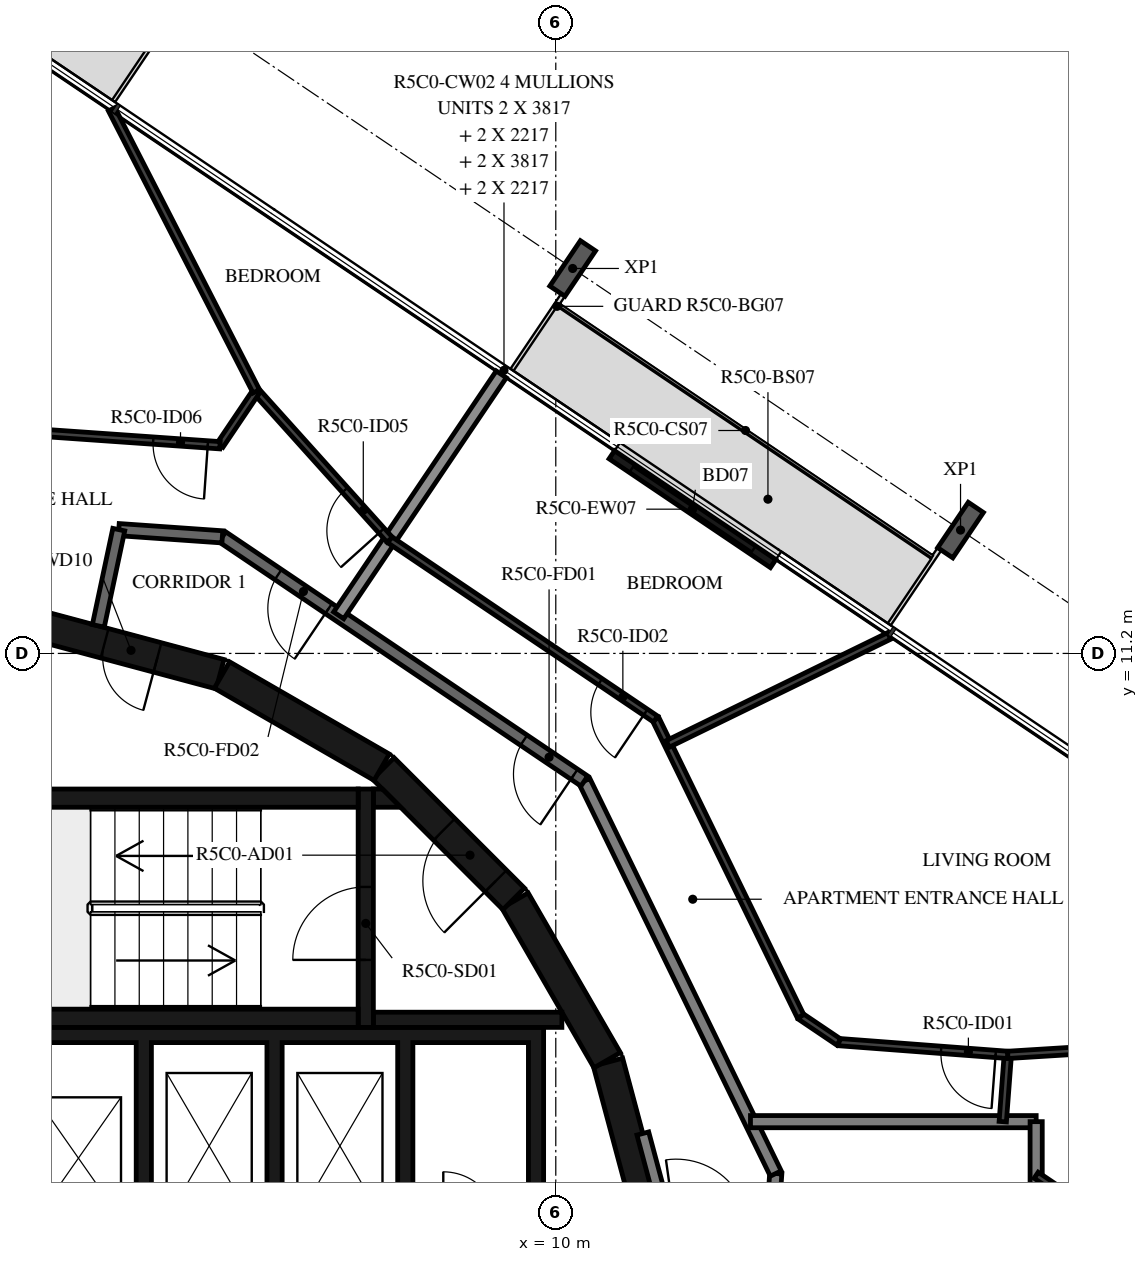
"""IFC4 building model, lengths in metres.
Left out: names, types, materials, properties, quantities, classifications, styles, units other than length and angle.
Written with IfcOpenShell. Run it as: python <this file> out.ifc"""

import sys

from ifc_helpers import new_model, si_unit, direction, frame, frame_2d, origin, origin_2d, place, context, subcontext, project, spatial, polyline, rectangle, i_section, outline, extrude, element, fill, save


model = new_model("IFC4")
c1 = context("Model", 3, precision=1e-05, world=origin(), true_north=direction((0.0, 1.0)))
c2 = subcontext(c1, "Body", "Model", "MODEL_VIEW")
j1 = project(units=[si_unit("LENGTHUNIT", "METRE"), si_unit("PLANEANGLEUNIT", "RADIAN")], contexts=[c1])
p1 = place(None, origin())
s1 = spatial("IfcSite", under=j1, at=p1, CompositionType="ELEMENT")
p2 = place(p1, origin())
s2 = spatial("IfcBuilding", under=s1, at=p2, CompositionType="ELEMENT")
p3 = place(p2, frame((0.0, 0.0, 209.4)))
s3 = spatial("IfcBuildingStorey", under=s2, at=p3, CompositionType="ELEMENT", Elevation=209.4)
for number, where, z_axis, x_axis in (
    (1, (16.656, 13.228, -0.38), (0.0, 0.0, 1.0), (0.829, -0.559, 0.0)),
    (2, (10.278, 17.531, -0.38), (0.0, 0.0, 1.0), (0.829, -0.559, 0.0)),
):
    element("IfcColumn", number, at=place(p3, frame(where, z_axis=z_axis, x_axis=x_axis)), inside=s3, PredefinedType="COLUMN", context=c2, shape_type="SweptSolid", body=[
        extrude(i_section(OverallWidth=0.3, OverallDepth=0.9, WebThickness=0.019, FlangeThickness=0.035, FilletRadius=0.03, at=origin_2d()), origin(), (0.0, 0.0, 1.0), 3.5),
    ])
p4 = place(p3, frame((13.574, 12.677, 0.0), z_axis=(0.0, 0.0, 1.0), x_axis=(-0.829068838882, 0.55914654644, 0.0)))
e3 = element("IfcWall", 3, at=p4, inside=s3, PredefinedType="STANDARD", context=c2, shape_type="SweptSolid", body=[
    extrude(rectangle(XDim=3.2, YDim=0.16, at=frame_2d((1.6, 0.0))), origin(), (0.0, 0.0, 1.0), 3.12),
])
p5 = place(p4, frame((0.4, 0.0, 0.0)))
e4 = element("IfcOpeningElement", 4, at=p5, cuts=e3, PredefinedType="OPENING", context=c2, shape_type="SweptSolid", body=[
    extrude(rectangle(XDim=2.4, YDim=2.4, at=frame_2d((1.2, 1.2))), frame((0.0, 0.09, 0.0), z_axis=(0.0, -1.0, 0.0), x_axis=(1.0, 0.0, 0.0)), (0.0, 0.0, 1.0), 0.18),
])
for number, where, z_axis, x_axis in (
    (5, (11.643, 1.55, 0.0), (0.0, 0.0, 1.0), (-0.259, 0.966, 0.0)),
    (6, (10.845, 4.51, 0.0), (0.0, 0.0, 1.0), (-0.5, 0.866, 0.0)),
):
    element("IfcWall", number, at=place(p3, frame(where, z_axis=z_axis, x_axis=x_axis)), inside=s3, PredefinedType="SHEAR", context=c2, shape_type="SweptSolid", body=[
        extrude(rectangle(XDim=3.033, YDim=0.5, at=frame_2d((1.516, 0.0))), origin(), (0.0, 0.0, 1.0), 3.12),
    ])
p6 = place(p3, frame((9.308, 7.164, 0.0), z_axis=(0.0, 0.0, 1.0), x_axis=(-0.707106781187, 0.707106781187, 0.0)))
e7 = element("IfcWall", 7, at=p6, inside=s3, PredefinedType="SHEAR", context=c2, shape_type="SweptSolid", body=[
    extrude(rectangle(XDim=3.032, YDim=0.5, at=frame_2d((1.516, 0.0))), origin(), (0.0, 0.0, 1.0), 3.12),
])
p7 = place(p6, frame((0.416, 0.0, 0.0)))
e8 = element("IfcOpeningElement", 8, at=p7, cuts=e7, PredefinedType="OPENING", context=c2, shape_type="SweptSolid", body=[
    extrude(rectangle(XDim=1.2, YDim=2.1, at=frame_2d((0.6, 1.05))), frame((0.0, 0.26, 0.0), z_axis=(0.0, -1.0, 0.0), x_axis=(1.0, 0.0, 0.0)), (0.0, 0.0, 1.0), 0.52),
])
p8 = place(p3, frame((7.137, 9.329, 0.0), z_axis=(0.0, 0.0, 1.0), x_axis=(-0.865975092491, 0.500087131594, 0.0)))
e9 = element("IfcWall", 9, at=p8, inside=s3, PredefinedType="SHEAR", context=c2, shape_type="SweptSolid", body=[
    extrude(rectangle(XDim=3.033, YDim=0.5, at=frame_2d((1.516, 0.0))), origin(), (0.0, 0.0, 1.0), 3.12),
])
p9 = place(p3, frame((4.479, 10.858, 0.0), z_axis=(0.0, 0.0, 1.0), x_axis=(-0.965948410781, 0.258734743916, 0.0)))
e10 = element("IfcWall", 10, at=p9, inside=s3, PredefinedType="SHEAR", context=c2, shape_type="SweptSolid", body=[
    extrude(rectangle(XDim=3.033, YDim=0.5, at=frame_2d((1.516, 0.0))), origin(), (0.0, 0.0, 1.0), 3.12),
])
p10 = place(p9, frame((1.066, 0.0, 0.0)))
e11 = element("IfcOpeningElement", 11, at=p10, cuts=e10, PredefinedType="OPENING", context=c2, shape_type="SweptSolid", body=[
    extrude(rectangle(XDim=0.9, YDim=2.1, at=frame_2d((0.45, 1.05))), frame((0.0, 0.26, 0.0), z_axis=(0.0, -1.0, 0.0), x_axis=(1.0, 0.0, 0.0)), (0.0, 0.0, 1.0), 0.52),
])
for number, where, z_axis, x_axis in (
    (12, (0.0, 5.2, 0.0), (0.0, 0.0, 1.0), (1.0, 0.0, 0.0)),
    (13, (0.0, 8.82, 0.0), (0.0, 0.0, 1.0), (1.0, 0.0, 0.0)),
):
    element("IfcWall", number, at=place(p3, frame(where, z_axis=z_axis, x_axis=x_axis)), inside=s3, PredefinedType="SHEAR", context=c2, shape_type="SweptSolid", body=[
        extrude(rectangle(XDim=6.75, YDim=0.3, at=frame_2d((3.375, 0.0))), origin(), (0.0, 0.0, 1.0), 3.12),
    ])
p11 = place(p3, frame((6.875, 5.05, 0.0), z_axis=(0.0, 0.0, 1.0), x_axis=(0.0, 1.0, 0.0)))
e14 = element("IfcWall", 14, at=p11, inside=s3, PredefinedType="SHEAR", context=c2, shape_type="SweptSolid", body=[
    extrude(rectangle(XDim=3.92, YDim=0.25, at=frame_2d((1.96, 0.0))), origin(), (0.0, 0.0, 1.0), 3.12),
])
p12 = place(p11, frame((1.11, 0.0, 0.0)))
e15 = element("IfcOpeningElement", 15, at=p12, cuts=e14, PredefinedType="OPENING", context=c2, shape_type="SweptSolid", body=[
    extrude(rectangle(XDim=1.2, YDim=2.1, at=frame_2d((0.6, 1.05))), frame((0.0, 0.135, 0.0), z_axis=(0.0, -1.0, 0.0), x_axis=(1.0, 0.0, 0.0)), (0.0, 0.0, 1.0), 0.27),
])
p13 = place(p3, frame((7.0, 5.175, 0.0), z_axis=(0.0, 0.0, 1.0), x_axis=(1.0, 0.0, 0.0)))
e16 = element("IfcWall", 16, at=p13, inside=s3, PredefinedType="SHEAR", context=c2, shape_type="SweptSolid", body=[
    extrude(rectangle(XDim=3.1, YDim=0.25, at=frame_2d((1.55, 0.0))), origin(), (0.0, 0.0, 1.0), 3.12),
])
p14 = place(p3, origin())
e17 = element("IfcWall", 17, at=p14, inside=s3, PredefinedType="SHEAR", context=c2, shape_type="SweptSolid", body=[
    extrude(outline(polyline([(7.448, 8.67), (7.0, 8.67), (7.0, 8.97), (7.148, 8.97), (7.448, 8.67)])), origin(), (0.0, 0.0, 1.0), 3.12),
])
p15 = place(p3, origin())
e18 = element("IfcWall", 18, at=p15, inside=s3, PredefinedType="SHEAR", context=c2, shape_type="SweptSolid", body=[
    extrude(outline(polyline([(-9.55, 4.8), (-5.5, 4.8), (-5.5, 1.9), (-5.25, 1.9), (-5.25, 4.8), (-1.2, 4.8), (-1.2, 1.9), (-0.95, 1.9), (-0.95, 4.8), (0.95, 4.8), (0.95, 1.9), (1.2, 1.9), (1.2, 4.8), (3.1, 4.8), (3.1, 1.9), (3.35, 1.9), (3.35, 4.8), (5.25, 4.8), (5.25, 1.9), (5.5, 1.9), (5.5, 4.8), (7.4, 4.8), (7.4, 1.9), (7.65, 1.9), (7.65, 4.8), (9.55, 4.8), (9.55, 1.9), (9.8, 1.9), (9.8, 4.8), (9.8, 5.05), (-9.8, 5.05), (-9.8, 4.8), (-9.8, 1.9), (-9.55, 1.9), (-9.55, 4.8)])), origin(), (0.0, 0.0, 1.0), 3.12),
])
p16 = place(p3, frame((11.87, 1.668, 0.0), z_axis=(0.0, 0.0, 1.0), x_axis=(-0.258836880648, 0.965921047093, 0.0)))
e19 = element("IfcWall", 19, at=p16, inside=s3, PredefinedType="STANDARD", context=c2, shape_type="SweptSolid", body=[
    extrude(rectangle(XDim=1.695, YDim=0.2, at=frame_2d((0.848, 0.0))), origin(), (0.0, 0.0, 1.0), 3.12),
])
p17 = place(p3, frame((13.566, 1.906, 0.0), z_axis=(0.0, 0.0, 1.0), x_axis=(0.07005495793, 0.997543133338, 0.0)))
e20 = element("IfcWall", 20, at=p17, inside=s3, PredefinedType="STANDARD", context=c2, shape_type="SweptSolid", body=[
    extrude(rectangle(XDim=0.742, YDim=0.2, at=frame_2d((0.371, 0.0))), origin(), (0.0, 0.0, 1.0), 3.12),
])
p18 = place(p3, frame((13.618, 2.647, 0.0), z_axis=(0.0, 0.0, 1.0), x_axis=(-0.438366026218, 0.898796543751, 0.0)))
e21 = element("IfcWall", 21, at=p18, inside=s3, PredefinedType="STANDARD", context=c2, shape_type="SweptSolid", body=[
    extrude(rectangle(XDim=7.181, YDim=0.2, at=frame_2d((3.591, 0.0))), origin(), (0.0, 0.0, 1.0), 3.12),
])
p19 = place(p3, frame((10.47, 9.101, 0.0), z_axis=(0.0, 0.0, 1.0), x_axis=(-0.829035841718, 0.559195469534, 0.0)))
e22 = element("IfcWall", 22, at=p19, inside=s3, PredefinedType="STANDARD", context=c2, shape_type="SweptSolid", body=[
    extrude(rectangle(XDim=7.181, YDim=0.2, at=frame_2d((3.591, 0.0))), origin(), (0.0, 0.0, 1.0), 3.12),
])
p20 = place(p19, frame((0.2, 0.0, 0.0)))
e23 = element("IfcOpeningElement", 23, at=p20, cuts=e22, PredefinedType="OPENING", context=c2, shape_type="SweptSolid", body=[
    extrude(rectangle(XDim=1.0, YDim=2.1, at=frame_2d((0.5, 1.05))), frame((0.0, 0.11, 0.0), z_axis=(0.0, -1.0, 0.0), x_axis=(1.0, 0.0, 0.0)), (0.0, 0.0, 1.0), 0.22),
])
p21 = place(p19, frame((5.073, 0.0, 0.0)))
e24 = element("IfcOpeningElement", 24, at=p21, cuts=e22, PredefinedType="OPENING", context=c2, shape_type="SweptSolid", body=[
    extrude(rectangle(XDim=1.0, YDim=2.1, at=frame_2d((0.5, 1.05))), frame((0.0, 0.11, 0.0), z_axis=(0.0, -1.0, 0.0), x_axis=(1.0, 0.0, 0.0)), (0.0, 0.0, 1.0), 0.22),
])
p22 = place(p3, frame((4.517, 13.117, 0.0), z_axis=(0.0, 0.0, 1.0), x_axis=(-0.997562153664, 0.069783591025, 0.0)))
e25 = element("IfcWall", 25, at=p22, inside=s3, PredefinedType="STANDARD", context=c2, shape_type="SweptSolid", body=[
    extrude(rectangle(XDim=1.707, YDim=0.2, at=frame_2d((0.854, 0.0))), origin(), (0.0, 0.0, 1.0), 3.12),
])
p23 = place(p3, frame((2.813, 13.236, 0.0), z_axis=(0.0, 0.0, 1.0), x_axis=(-0.207911086063, -0.978147729278, 0.0)))
e26 = element("IfcWall", 26, at=p23, inside=s3, PredefinedType="STANDARD", context=c2, shape_type="SweptSolid", body=[
    extrude(rectangle(XDim=1.618, YDim=0.2, at=frame_2d((0.809, 0.0))), origin(), (0.0, 0.0, 1.0), 3.12),
])
p24 = place(p3, frame((17.9, 3.5, 0.0), z_axis=(0.0, 0.0, 1.0), x_axis=(-1.0, 0.0, 0.0)))
e27 = element("IfcWall", 27, at=p24, inside=s3, PredefinedType="STANDARD", context=c2, shape_type="SweptSolid", body=[
    extrude(rectangle(XDim=4.698, YDim=0.2, at=frame_2d((2.349, 0.0))), origin(), (0.0, 0.0, 1.0), 3.12),
])
p25 = place(p3, frame((17.9, -3.5, 0.0), z_axis=(0.0, 0.0, 1.0), x_axis=(0.0, 1.0, 0.0)))
e28 = element("IfcWall", 28, at=p25, inside=s3, PredefinedType="STANDARD", context=c2, shape_type="SweptSolid", body=[
    extrude(rectangle(XDim=7.0, YDim=0.2, at=frame_2d((3.5, 0.0))), origin(), (0.0, 0.0, 1.0), 3.12),
])
p26 = place(p3, frame((9.104, 15.79, 0.0), z_axis=(0.0, 0.0, 1.0), x_axis=(-0.559193912135, -0.829036892201, 0.0)))
e29 = element("IfcWall", 29, at=p26, inside=s3, PredefinedType="STANDARD", context=c2, shape_type="SweptSolid", body=[
    extrude(rectangle(XDim=4.781, YDim=0.2, at=frame_2d((2.39, 0.0))), origin(), (0.0, 0.0, 1.0), 2.73),
])
p27 = place(p3, frame((17.351, 3.5, 0.0), z_axis=(0.0, 0.0, 1.0), x_axis=(0.075374124137, 0.997155324616, 0.0)))
e30 = element("IfcWall", 30, at=p27, inside=s3, PredefinedType="PARTITIONING", context=c2, shape_type="SweptSolid", body=[
    extrude(rectangle(XDim=1.101, YDim=0.12, at=frame_2d((0.551, 0.0))), origin(), (0.0, 0.0, 1.0), 3.12),
])
p28 = place(p3, frame((17.434, 4.598, 0.0), z_axis=(0.0, 0.0, 1.0), x_axis=(-0.997152077354, 0.075417071205, 0.0)))
e31 = element("IfcWall", 31, at=p28, inside=s3, PredefinedType="PARTITIONING", context=c2, shape_type="SweptSolid", body=[
    extrude(rectangle(XDim=2.787, YDim=0.12, at=frame_2d((1.394, 0.0))), origin(), (0.0, 0.0, 1.0), 3.12),
])
p29 = place(p28, frame((0.2, 0.0, 0.0)))
e32 = element("IfcOpeningElement", 32, at=p29, cuts=e31, PredefinedType="OPENING", context=c2, shape_type="SweptSolid", body=[
    extrude(rectangle(XDim=0.9, YDim=2.1, at=frame_2d((0.45, 1.05))), frame((0.0, 0.07, 0.0), z_axis=(0.0, -1.0, 0.0), x_axis=(1.0, 0.0, 0.0)), (0.0, 0.0, 1.0), 0.14),
])
p30 = place(p3, frame((14.654, 4.808, 0.0), z_axis=(0.0, 0.0, 1.0), x_axis=(-0.829065184024, 0.559151965604, 0.0)))
e33 = element("IfcWall", 33, at=p30, inside=s3, PredefinedType="PARTITIONING", context=c2, shape_type="SweptSolid", body=[
    extrude(rectangle(XDim=0.758, YDim=0.12, at=frame_2d((0.379, 0.0))), origin(), (0.0, 0.0, 1.0), 3.12),
])
p31 = place(p3, frame((14.026, 5.232, 0.0), z_axis=(0.0, 0.0, 1.0), x_axis=(-0.438374985284, 0.89879217413, 0.0)))
e34 = element("IfcWall", 34, at=p31, inside=s3, PredefinedType="PARTITIONING", context=c2, shape_type="SweptSolid", body=[
    extrude(rectangle(XDim=5.438, YDim=0.12, at=frame_2d((2.719, 0.0))), origin(), (0.0, 0.0, 1.0), 3.12),
])
p32 = place(p3, frame((11.642, 10.12, 0.0), z_axis=(0.0, 0.0, 1.0), x_axis=(-0.829054664054, 0.559167563446, 0.0)))
e35 = element("IfcWall", 35, at=p32, inside=s3, PredefinedType="PARTITIONING", context=c2, shape_type="SweptSolid", body=[
    extrude(rectangle(XDim=5.275, YDim=0.12, at=frame_2d((2.637, 0.0))), origin(), (0.0, 0.0, 1.0), 3.12),
])
p33 = place(p32, frame((0.2, 0.0, 0.0)))
e36 = element("IfcOpeningElement", 36, at=p33, cuts=e35, PredefinedType="OPENING", context=c2, shape_type="SweptSolid", body=[
    extrude(rectangle(XDim=0.9, YDim=2.1, at=frame_2d((0.45, 1.05))), frame((0.0, 0.07, 0.0), z_axis=(0.0, -1.0, 0.0), x_axis=(1.0, 0.0, 0.0)), (0.0, 0.0, 1.0), 0.14),
])
p34 = place(p3, frame((21.141, 0.433, 0.0), z_axis=(0.0, 0.0, 1.0), x_axis=(-0.829049908454, 0.559174614313, 0.0)))
e37 = element("IfcWall", 37, at=p34, inside=s3, PredefinedType="PARTITIONING", context=c2, shape_type="SweptSolid", body=[
    extrude(rectangle(XDim=3.909, YDim=0.12, at=frame_2d((1.955, 0.0))), origin(), (0.0, 0.0, 1.0), 3.12),
])
p35 = place(p34, frame((0.8, 0.0, 0.0)))
e38 = element("IfcOpeningElement", 38, at=p35, cuts=e37, PredefinedType="OPENING", context=c2, shape_type="SweptSolid", body=[
    extrude(rectangle(XDim=0.8, YDim=2.1, at=frame_2d((0.4, 1.05))), frame((0.0, 0.07, 0.0), z_axis=(0.0, -1.0, 0.0), x_axis=(1.0, 0.0, 0.0)), (0.0, 0.0, 1.0), 0.14),
])
p36 = place(p3, frame((24.956, 5.065, 0.0), z_axis=(0.0, 0.0, 1.0), x_axis=(-0.998076202118, -0.061999151332, 0.0)))
e39 = element("IfcWall", 39, at=p36, inside=s3, PredefinedType="PARTITIONING", context=c2, shape_type="SweptSolid", body=[
    extrude(rectangle(XDim=7.537, YDim=0.12, at=frame_2d((3.769, 0.0))), origin(), (0.0, 0.0, 1.0), 3.12),
])
p37 = place(p36, frame((1.0, 0.0, 0.0)))
e40 = element("IfcOpeningElement", 40, at=p37, cuts=e39, PredefinedType="OPENING", context=c2, shape_type="SweptSolid", body=[
    extrude(rectangle(XDim=0.9, YDim=2.1, at=frame_2d((0.45, 1.05))), frame((0.0, 0.07, 0.0), z_axis=(0.0, -1.0, 0.0), x_axis=(1.0, 0.0, 0.0)), (0.0, 0.0, 1.0), 0.14),
])
p38 = place(p3, frame((15.482, 11.487, 0.0), z_axis=(0.0, 0.0, 1.0), x_axis=(-0.898807251285, -0.438344071521, 0.0)))
e41 = element("IfcWall", 41, at=p38, inside=s3, PredefinedType="PARTITIONING", context=c2, shape_type="SweptSolid", body=[
    extrude(rectangle(XDim=4.051, YDim=0.12, at=frame_2d((2.025, 0.0))), origin(), (0.0, 0.0, 1.0), 3.12),
])
p39 = place(p3, frame((7.269, 13.07, 0.0), z_axis=(0.0, 0.0, 1.0), x_axis=(-0.668495993587, 0.743715743116, 0.0)))
e42 = element("IfcWall", 42, at=p39, inside=s3, PredefinedType="PARTITIONING", context=c2, shape_type="SweptSolid", body=[
    extrude(rectangle(XDim=3.281, YDim=0.12, at=frame_2d((1.641, 0.0))), origin(), (0.0, 0.0, 1.0), 3.12),
])
p40 = place(p39, frame((0.2, 0.0, 0.0)))
e43 = element("IfcOpeningElement", 43, at=p40, cuts=e42, PredefinedType="OPENING", context=c2, shape_type="SweptSolid", body=[
    extrude(rectangle(XDim=0.9, YDim=2.1, at=frame_2d((0.45, 1.05))), frame((0.0, 0.07, 0.0), z_axis=(0.0, -1.0, 0.0), x_axis=(1.0, 0.0, 0.0)), (0.0, 0.0, 1.0), 0.14),
])
p41 = place(p3, frame((5.075, 15.51, 0.0), z_axis=(0.0, 0.0, 1.0), x_axis=(-0.559221936342, -0.829017988896, 0.0)))
e44 = element("IfcWall", 44, at=p41, inside=s3, PredefinedType="PARTITIONING", context=c2, shape_type="SweptSolid", body=[
    extrude(rectangle(XDim=1.07, YDim=0.12, at=frame_2d((0.535, 0.0))), origin(), (0.0, 0.0, 1.0), 3.12),
])
p42 = place(p3, frame((4.477, 14.623, 0.0), z_axis=(0.0, 0.0, 1.0), x_axis=(-0.997564862172, 0.069744861884, 0.0)))
e45 = element("IfcWall", 45, at=p42, inside=s3, PredefinedType="PARTITIONING", context=c2, shape_type="SweptSolid", body=[
    extrude(rectangle(XDim=7.438, YDim=0.12, at=frame_2d((3.719, 0.0))), origin(), (0.0, 0.0, 1.0), 3.12),
])
p43 = place(p42, frame((0.2, 0.0, 0.0)))
e46 = element("IfcOpeningElement", 46, at=p43, cuts=e45, PredefinedType="OPENING", context=c2, shape_type="SweptSolid", body=[
    extrude(rectangle(XDim=0.9, YDim=2.1, at=frame_2d((0.45, 1.05))), frame((0.0, 0.07, 0.0), z_axis=(0.0, -1.0, 0.0), x_axis=(1.0, 0.0, 0.0)), (0.0, 0.0, 1.0), 0.14),
])
p44 = place(p42, frame((6.392, 0.0, 0.0)))
e47 = element("IfcOpeningElement", 47, at=p44, cuts=e45, PredefinedType="OPENING", context=c2, shape_type="SweptSolid", body=[
    extrude(rectangle(XDim=0.8, YDim=2.1, at=frame_2d((0.4, 1.05))), frame((0.0, 0.07, 0.0), z_axis=(0.0, -1.0, 0.0), x_axis=(1.0, 0.0, 0.0)), (0.0, 0.0, 1.0), 0.14),
])
p45 = place(p3, frame((2.696, 20.148, 0.0), z_axis=(0.0, 0.0, 1.0), x_axis=(0.456387956197, -0.889780890691, 0.0)))
e48 = element("IfcWall", 48, at=p45, inside=s3, PredefinedType="PARTITIONING", context=c2, shape_type="SweptSolid", body=[
    extrude(rectangle(XDim=5.213, YDim=0.12, at=frame_2d((2.606, 0.0))), origin(), (0.0, 0.0, 1.0), 3.12),
])
p46 = place(p5, origin())
e49 = element("IfcDoor", 49, at=p46, inside=s3, OperationType="DOUBLE_DOOR_SLIDING", PredefinedType="DOOR", context=c2, shape_type="SweptSolid", body=[
    extrude(rectangle(XDim=2.4, YDim=2.4, at=frame_2d((1.2, 1.2))), frame((0.0, 0.025, 0.0), z_axis=(0.0, -1.0, 0.0), x_axis=(1.0, 0.0, 0.0)), (0.0, 0.0, 1.0), 0.05),
])
fill(e4, e49)
p47 = place(p12, origin())
e50 = element("IfcDoor", 50, at=p47, inside=s3, OperationType="SINGLE_SWING_LEFT", PredefinedType="DOOR", context=c2, shape_type="SweptSolid", body=[
    extrude(rectangle(XDim=1.2, YDim=2.1, at=frame_2d((0.6, 1.05))), frame((0.0, 0.025, 0.0), z_axis=(0.0, -1.0, 0.0), x_axis=(1.0, 0.0, 0.0)), (0.0, 0.0, 1.0), 0.05),
])
fill(e15, e50)
p48 = place(p7, origin())
e51 = element("IfcDoor", 51, at=p48, inside=s3, OperationType="SINGLE_SWING_RIGHT", PredefinedType="DOOR", context=c2, shape_type="SweptSolid", body=[
    extrude(rectangle(XDim=1.2, YDim=2.1, at=frame_2d((0.6, 1.05))), frame((0.0, 0.025, 0.0), z_axis=(0.0, -1.0, 0.0), x_axis=(1.0, 0.0, 0.0)), (0.0, 0.0, 1.0), 0.05),
])
fill(e8, e51)
p49 = place(p10, origin())
e52 = element("IfcDoor", 52, at=p49, inside=s3, OperationType="SINGLE_SWING_RIGHT", PredefinedType="DOOR", context=c2, shape_type="SweptSolid", body=[
    extrude(rectangle(XDim=0.9, YDim=2.1, at=frame_2d((0.45, 1.05))), frame((0.0, 0.025, 0.0), z_axis=(0.0, -1.0, 0.0), x_axis=(1.0, 0.0, 0.0)), (0.0, 0.0, 1.0), 0.05),
])
fill(e11, e52)
p50 = place(p20, origin())
e53 = element("IfcDoor", 53, at=p50, inside=s3, OperationType="SINGLE_SWING_LEFT", PredefinedType="DOOR", context=c2, shape_type="SweptSolid", body=[
    extrude(rectangle(XDim=1.0, YDim=2.1, at=frame_2d((0.5, 1.05))), frame((0.0, 0.025, 0.0), z_axis=(0.0, -1.0, 0.0), x_axis=(1.0, 0.0, 0.0)), (0.0, 0.0, 1.0), 0.05),
])
fill(e23, e53)
p51 = place(p29, origin())
e54 = element("IfcDoor", 54, at=p51, inside=s3, OperationType="SINGLE_SWING_LEFT", PredefinedType="DOOR", context=c2, shape_type="SweptSolid", body=[
    extrude(rectangle(XDim=0.9, YDim=2.1, at=frame_2d((0.45, 1.05))), frame((0.0, 0.025, 0.0), z_axis=(0.0, -1.0, 0.0), x_axis=(1.0, 0.0, 0.0)), (0.0, 0.0, 1.0), 0.05),
])
fill(e32, e54)
p52 = place(p33, origin())
e55 = element("IfcDoor", 55, at=p52, inside=s3, OperationType="SINGLE_SWING_LEFT", PredefinedType="DOOR", context=c2, shape_type="SweptSolid", body=[
    extrude(rectangle(XDim=0.9, YDim=2.1, at=frame_2d((0.45, 1.05))), frame((0.0, 0.025, 0.0), z_axis=(0.0, -1.0, 0.0), x_axis=(1.0, 0.0, 0.0)), (0.0, 0.0, 1.0), 0.05),
])
fill(e36, e55)
p53 = place(p21, origin())
e56 = element("IfcDoor", 56, at=p53, inside=s3, OperationType="SINGLE_SWING_RIGHT", PredefinedType="DOOR", context=c2, shape_type="SweptSolid", body=[
    extrude(rectangle(XDim=1.0, YDim=2.1, at=frame_2d((0.5, 1.05))), frame((0.0, 0.025, 0.0), z_axis=(0.0, -1.0, 0.0), x_axis=(1.0, 0.0, 0.0)), (0.0, 0.0, 1.0), 0.05),
])
fill(e24, e56)
p54 = place(p40, origin())
e57 = element("IfcDoor", 57, at=p54, inside=s3, OperationType="SINGLE_SWING_RIGHT", PredefinedType="DOOR", context=c2, shape_type="SweptSolid", body=[
    extrude(rectangle(XDim=0.9, YDim=2.1, at=frame_2d((0.45, 1.05))), frame((0.0, 0.025, 0.0), z_axis=(0.0, -1.0, 0.0), x_axis=(1.0, 0.0, 0.0)), (0.0, 0.0, 1.0), 0.05),
])
fill(e43, e57)
p55 = place(p43, origin())
e58 = element("IfcDoor", 58, at=p55, inside=s3, OperationType="SINGLE_SWING_RIGHT", PredefinedType="DOOR", context=c2, shape_type="SweptSolid", body=[
    extrude(rectangle(XDim=0.9, YDim=2.1, at=frame_2d((0.45, 1.05))), frame((0.0, 0.025, 0.0), z_axis=(0.0, -1.0, 0.0), x_axis=(1.0, 0.0, 0.0)), (0.0, 0.0, 1.0), 0.05),
])
fill(e46, e58)
save(model, sys.argv[1])
